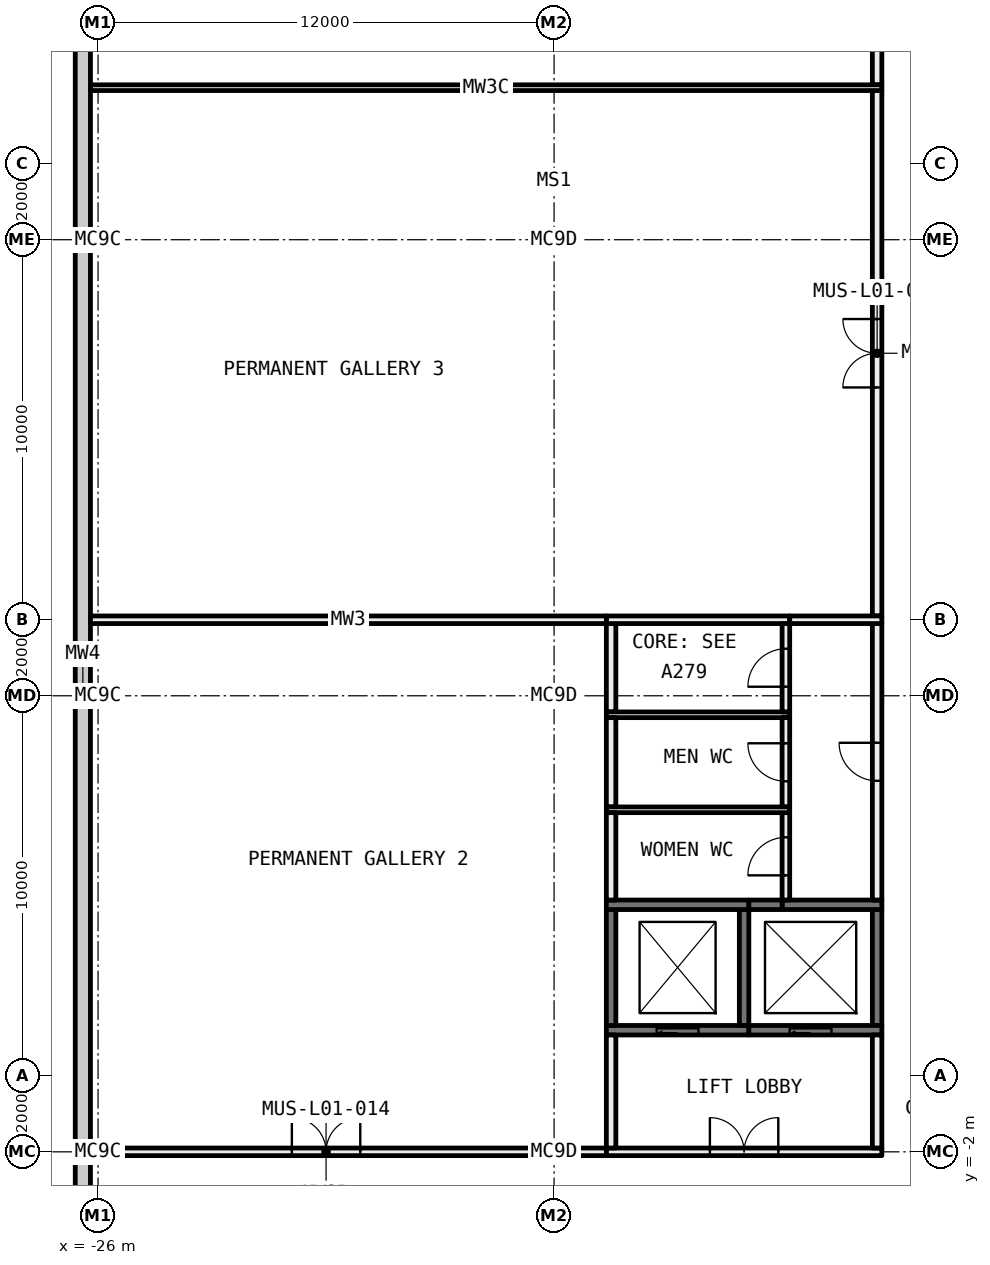
"""IFC4 building model, lengths in metres.
Left out: names, types, materials, properties, quantities, classifications, styles, units other than length and angle.
Written with IfcOpenShell. Run it as: python <this file> out.ifc"""

import sys

from ifc_helpers import new_model, si_unit, direction, frame, frame_2d, origin, origin_2d, place, context, subcontext, project, spatial, rectangle, i_section, extrude, element, fill, save


model = new_model("IFC4")
c1 = context("Model", 3, precision=1e-05, world=origin(), true_north=direction((0.0, 1.0)))
c2 = subcontext(c1, "Body", "Model", "MODEL_VIEW")
j1 = project(units=[si_unit("LENGTHUNIT", "METRE"), si_unit("PLANEANGLEUNIT", "RADIAN")], contexts=[c1])
p1 = place(None, origin())
s1 = spatial("IfcSite", under=j1, at=p1, CompositionType="ELEMENT")
p2 = place(p1, origin())
s2 = spatial("IfcBuilding", under=s1, at=p2, CompositionType="ELEMENT")
p3 = place(p2, frame((0.0, 0.0, 6.0)))
s3 = spatial("IfcBuildingStorey", under=s2, at=p3, CompositionType="ELEMENT", Elevation=6.0)
for number, where, z_axis, x_axis in (
    (1, (-26.0, -2.0, 0.0), (0.0, 0.0, 1.0), (1.0, 0.0, 0.0)),
    (2, (-26.0, 10.0, 0.0), (0.0, 0.0, 1.0), (1.0, 0.0, 0.0)),
    (3, (-26.0, 22.0, 0.0), (0.0, 0.0, 1.0), (1.0, 0.0, 0.0)),
    (4, (-14.0, -2.0, 0.0), (0.0, 0.0, 1.0), (1.0, 0.0, 0.0)),
    (5, (-14.0, 10.0, 0.0), (0.0, 0.0, 1.0), (1.0, 0.0, 0.0)),
    (6, (-14.0, 22.0, 0.0), (0.0, 0.0, 1.0), (1.0, 0.0, 0.0)),
):
    element("IfcColumn", number, at=place(p3, frame(where, z_axis=z_axis, x_axis=x_axis)), inside=s3, PredefinedType="COLUMN", context=c2, shape_type="SweptSolid", body=[
        extrude(i_section(OverallWidth=0.4, OverallDepth=0.4, WebThickness=0.013, FlangeThickness=0.021, FilletRadius=0.022, at=origin_2d()), origin(), (0.0, 0.0, 1.0), 5.6),
    ])
p4 = place(p3, frame((-12.5, 9.575, 0.0), z_axis=(0.0, 0.0, 1.0), x_axis=(0.0, 1.0, 0.0)))
e7 = element("IfcWall", 7, at=p4, inside=s3, PredefinedType="PARTITIONING", context=c2, shape_type="SweptSolid", body=[
    extrude(rectangle(XDim=2.325, YDim=0.25, at=frame_2d((1.163, 0.0))), origin(), (0.0, 0.0, 1.0), 5.6),
])
p5 = place(p3, frame((-12.625, 12.0, 0.0), z_axis=(0.0, 0.0, 1.0), x_axis=(1.0, 0.0, 0.0)))
e8 = element("IfcWall", 8, at=p5, inside=s3, PredefinedType="PARTITIONING", context=c2, shape_type="SweptSolid", body=[
    extrude(rectangle(XDim=4.825, YDim=0.2, at=frame_2d((2.413, 0.0))), origin(), (0.0, 0.0, 1.0), 5.6),
])
p6 = place(p3, frame((-12.625, -2.0, 0.0), z_axis=(0.0, 0.0, 1.0), x_axis=(1.0, 0.0, 0.0)))
e9 = element("IfcWall", 9, at=p6, inside=s3, PredefinedType="PARTITIONING", context=c2, shape_type="SweptSolid", body=[
    extrude(rectangle(XDim=7.25, YDim=0.2, at=frame_2d((3.625, 0.0))), origin(), (0.0, 0.0, 1.0), 5.012),
])
p7 = place(p6, frame((2.725, 0.0, 0.0)))
e10 = element("IfcOpeningElement", 10, at=p7, cuts=e9, PredefinedType="OPENING", context=c2, shape_type="SweptSolid", body=[
    extrude(rectangle(XDim=1.8, YDim=2.1, at=frame_2d((0.9, 1.05))), frame((0.0, 0.11, 0.0), z_axis=(0.0, -1.0, 0.0), x_axis=(1.0, 0.0, 0.0)), (0.0, 0.0, 1.0), 0.22),
])
p8 = place(p3, frame((-5.5, -1.9, 0.0), z_axis=(0.0, 0.0, 1.0), x_axis=(0.0, 1.0, 0.0)))
e11 = element("IfcWall", 11, at=p8, inside=s3, PredefinedType="PARTITIONING", context=c2, shape_type="SweptSolid", body=[
    extrude(rectangle(XDim=2.975, YDim=0.25, at=frame_2d((1.487, 0.0))), origin(), (0.0, 0.0, 1.0), 5.6),
])
p9 = place(p3, frame((-25.8, -2.0, 0.0), z_axis=(0.0, 0.0, 1.0), x_axis=(1.0, 0.0, 0.0)))
e12 = element("IfcWall", 12, at=p9, inside=s3, PredefinedType="PARTITIONING", context=c2, shape_type="SweptSolid", body=[
    extrude(rectangle(XDim=11.6, YDim=0.2, at=frame_2d((5.8, 0.0))), origin(), (0.0, 0.0, 1.0), 5.012),
])
p10 = place(p9, frame((4.9, 0.0, 0.0)))
e13 = element("IfcOpeningElement", 13, at=p10, cuts=e12, PredefinedType="OPENING", context=c2, shape_type="SweptSolid", body=[
    extrude(rectangle(XDim=1.8, YDim=2.1, at=frame_2d((0.9, 1.05))), frame((0.0, 0.11, 0.0), z_axis=(0.0, -1.0, 0.0), x_axis=(1.0, 0.0, 0.0)), (0.0, 0.0, 1.0), 0.22),
])
p11 = place(p3, frame((-13.8, -2.0, 0.0), z_axis=(0.0, 0.0, 1.0), x_axis=(1.0, 0.0, 0.0)))
e14 = element("IfcWall", 14, at=p11, inside=s3, PredefinedType="PARTITIONING", context=c2, shape_type="SweptSolid", body=[
    extrude(rectangle(XDim=1.175, YDim=0.2, at=frame_2d((0.587, 0.0))), origin(), (0.0, 0.0, 1.0), 5.012),
])
p12 = place(p3, frame((-5.5, 12.1, 0.0), z_axis=(0.0, 0.0, 1.0), x_axis=(0.0, 1.0, 0.0)))
e15 = element("IfcWall", 15, at=p12, inside=s3, PredefinedType="PARTITIONING", context=c2, shape_type="SweptSolid", body=[
    extrude(rectangle(XDim=13.825, YDim=0.25, at=frame_2d((6.913, 0.0))), origin(), (0.0, 0.0, 1.0), 5.6),
])
p13 = place(p12, frame((6.013, 0.0, 0.0)))
e16 = element("IfcOpeningElement", 16, at=p13, cuts=e15, PredefinedType="OPENING", context=c2, shape_type="SweptSolid", body=[
    extrude(rectangle(XDim=1.8, YDim=2.1, at=frame_2d((0.9, 1.05))), frame((0.0, 0.135, 0.0), z_axis=(0.0, -1.0, 0.0), x_axis=(1.0, 0.0, 0.0)), (0.0, 0.0, 1.0), 0.27),
])
p14 = place(p3, frame((-5.5, 1.325, 0.0), z_axis=(0.0, 0.0, 1.0), x_axis=(0.0, 1.0, 0.0)))
e17 = element("IfcWall", 17, at=p14, inside=s3, PredefinedType="SHEAR", context=c2, shape_type="SweptSolid", body=[
    extrude(rectangle(XDim=3.05, YDim=0.25, at=frame_2d((1.525, 0.0))), origin(), (0.0, 0.0, 1.0), 5.6),
])
p15 = place(p3, frame((-5.5, 26.075, 0.0), z_axis=(0.0, 0.0, 1.0), x_axis=(0.0, 1.0, 0.0)))
e18 = element("IfcWall", 18, at=p15, inside=s3, PredefinedType="PARTITIONING", context=c2, shape_type="SweptSolid", body=[
    extrude(rectangle(XDim=16.4, YDim=0.25, at=frame_2d((8.2, 0.0))), origin(), (0.0, 0.0, 1.0), 5.6),
])
p16 = place(p15, frame((7.3, 0.0, 0.0)))
e19 = element("IfcOpeningElement", 19, at=p16, cuts=e18, PredefinedType="OPENING", context=c2, shape_type="SweptSolid", body=[
    extrude(rectangle(XDim=1.8, YDim=2.1, at=frame_2d((0.9, 1.05))), frame((0.0, 0.135, 0.0), z_axis=(0.0, -1.0, 0.0), x_axis=(1.0, 0.0, 0.0)), (0.0, 0.0, 1.0), 0.27),
])
p17 = place(p3, frame((-5.5, 4.625, 0.0), z_axis=(0.0, 0.0, 1.0), x_axis=(0.0, 1.0, 0.0)))
e20 = element("IfcWall", 20, at=p17, inside=s3, PredefinedType="PARTITIONING", context=c2, shape_type="SweptSolid", body=[
    extrude(rectangle(XDim=7.275, YDim=0.25, at=frame_2d((3.637, 0.0))), origin(), (0.0, 0.0, 1.0), 5.6),
])
p18 = place(p17, frame((3.138, 0.0, 0.0)))
e21 = element("IfcOpeningElement", 21, at=p18, cuts=e20, PredefinedType="OPENING", context=c2, shape_type="SweptSolid", body=[
    extrude(rectangle(XDim=1.0, YDim=2.1, at=frame_2d((0.5, 1.05))), frame((0.0, 0.135, 0.0), z_axis=(0.0, -1.0, 0.0), x_axis=(1.0, 0.0, 0.0)), (0.0, 0.0, 1.0), 0.27),
])
p19 = place(p3, frame((-12.625, 1.2, 0.0), z_axis=(0.0, 0.0, 1.0), x_axis=(1.0, 0.0, 0.0)))
e22 = element("IfcWall", 22, at=p19, inside=s3, PredefinedType="SHEAR", context=c2, shape_type="SweptSolid", body=[
    extrude(rectangle(XDim=3.75, YDim=0.25, at=frame_2d((1.875, 0.0))), origin(), (0.0, 0.0, 1.0), 5.6),
])
p20 = place(p19, frame((1.325, 0.0, 0.0)))
e23 = element("IfcOpeningElement", 23, at=p20, cuts=e22, PredefinedType="OPENING", context=c2, shape_type="SweptSolid", body=[
    extrude(rectangle(XDim=1.1, YDim=2.1, at=frame_2d((0.55, 1.05))), frame((0.0, 0.135, 0.0), z_axis=(0.0, -1.0, 0.0), x_axis=(1.0, 0.0, 0.0)), (0.0, 0.0, 1.0), 0.27),
])
p21 = place(p3, frame((-12.5, -1.9, 0.0), z_axis=(0.0, 0.0, 1.0), x_axis=(0.0, 1.0, 0.0)))
e24 = element("IfcWall", 24, at=p21, inside=s3, PredefinedType="PARTITIONING", context=c2, shape_type="SweptSolid", body=[
    extrude(rectangle(XDim=2.975, YDim=0.25, at=frame_2d((1.487, 0.0))), origin(), (0.0, 0.0, 1.0), 5.6),
])
p22 = place(p3, frame((-8.875, 1.2, 0.0), z_axis=(0.0, 0.0, 1.0), x_axis=(1.0, 0.0, 0.0)))
e25 = element("IfcWall", 25, at=p22, inside=s3, PredefinedType="SHEAR", context=c2, shape_type="SweptSolid", body=[
    extrude(rectangle(XDim=3.5, YDim=0.25, at=frame_2d((1.75, 0.0))), origin(), (0.0, 0.0, 1.0), 5.6),
])
p23 = place(p22, frame((1.075, 0.0, 0.0)))
e26 = element("IfcOpeningElement", 26, at=p23, cuts=e25, PredefinedType="OPENING", context=c2, shape_type="SweptSolid", body=[
    extrude(rectangle(XDim=1.1, YDim=2.1, at=frame_2d((0.55, 1.05))), frame((0.0, 0.135, 0.0), z_axis=(0.0, -1.0, 0.0), x_axis=(1.0, 0.0, 0.0)), (0.0, 0.0, 1.0), 0.27),
])
p24 = place(p3, frame((-12.625, 9.5, 0.0), z_axis=(0.0, 0.0, 1.0), x_axis=(1.0, 0.0, 0.0)))
e27 = element("IfcWall", 27, at=p24, inside=s3, PredefinedType="PARTITIONING", context=c2, shape_type="SweptSolid", body=[
    extrude(rectangle(XDim=4.825, YDim=0.15, at=frame_2d((2.413, 0.0))), origin(), (0.0, 0.0, 1.0), 5.6),
])
p25 = place(p3, frame((-12.5, 7.075, 0.0), z_axis=(0.0, 0.0, 1.0), x_axis=(0.0, 1.0, 0.0)))
e28 = element("IfcWall", 28, at=p25, inside=s3, PredefinedType="PARTITIONING", context=c2, shape_type="SweptSolid", body=[
    extrude(rectangle(XDim=2.35, YDim=0.25, at=frame_2d((1.175, 0.0))), origin(), (0.0, 0.0, 1.0), 5.6),
])
for number, where, z_axis, x_axis in (
    (29, (-12.5, 1.325, 0.0), (0.0, 0.0, 1.0), (0.0, 1.0, 0.0)),
    (30, (-9.0, 1.325, 0.0), (0.0, 0.0, 1.0), (0.0, 1.0, 0.0)),
):
    element("IfcWall", number, at=place(p3, frame(where, z_axis=z_axis, x_axis=x_axis)), inside=s3, PredefinedType="SHEAR", context=c2, shape_type="SweptSolid", body=[
        extrude(rectangle(XDim=3.05, YDim=0.25, at=frame_2d((1.525, 0.0))), origin(), (0.0, 0.0, 1.0), 5.6),
    ])
p26 = place(p3, frame((-12.625, 4.5, 0.0), z_axis=(0.0, 0.0, 1.0), x_axis=(1.0, 0.0, 0.0)))
e31 = element("IfcWall", 31, at=p26, inside=s3, PredefinedType="SHEAR", context=c2, shape_type="SweptSolid", body=[
    extrude(rectangle(XDim=3.75, YDim=0.25, at=frame_2d((1.875, 0.0))), origin(), (0.0, 0.0, 1.0), 5.6),
])
p27 = place(p3, frame((-26.2, 12.0, 0.0), z_axis=(0.0, 0.0, 1.0), x_axis=(1.0, 0.0, 0.0)))
e32 = element("IfcWall", 32, at=p27, inside=s3, PredefinedType="PARTITIONING", context=c2, shape_type="SweptSolid", body=[
    extrude(rectangle(XDim=13.575, YDim=0.2, at=frame_2d((6.788, 0.0))), origin(), (0.0, 0.0, 1.0), 5.6),
])
p28 = place(p3, frame((-26.2, 26.0, 0.0), z_axis=(0.0, 0.0, 1.0), x_axis=(1.0, 0.0, 0.0)))
e33 = element("IfcWall", 33, at=p28, inside=s3, PredefinedType="PARTITIONING", context=c2, shape_type="SweptSolid", body=[
    extrude(rectangle(XDim=20.825, YDim=0.15, at=frame_2d((10.413, 0.0))), origin(), (0.0, 0.0, 1.0), 5.6),
])
p29 = place(p3, frame((-8.0, 4.5, 0.0), z_axis=(0.0, 0.0, 1.0), x_axis=(1.0, 0.0, 0.0)))
e34 = element("IfcWall", 34, at=p29, inside=s3, PredefinedType="SHEAR", context=c2, shape_type="SweptSolid", body=[
    extrude(rectangle(XDim=2.625, YDim=0.25, at=frame_2d((1.312, 0.0))), origin(), (0.0, 0.0, 1.0), 5.6),
])
p30 = place(p3, frame((-8.875, 4.5, 0.0), z_axis=(0.0, 0.0, 1.0), x_axis=(1.0, 0.0, 0.0)))
e35 = element("IfcWall", 35, at=p30, inside=s3, PredefinedType="SHEAR", context=c2, shape_type="SweptSolid", body=[
    extrude(rectangle(XDim=0.875, YDim=0.25, at=frame_2d((0.438, 0.0))), origin(), (0.0, 0.0, 1.0), 5.6),
])
p31 = place(p3, frame((-7.9, 9.575, 0.0), z_axis=(0.0, 0.0, 1.0), x_axis=(0.0, 1.0, 0.0)))
e36 = element("IfcWall", 36, at=p31, inside=s3, PredefinedType="PARTITIONING", context=c2, shape_type="SweptSolid", body=[
    extrude(rectangle(XDim=2.325, YDim=0.2, at=frame_2d((1.163, 0.0))), origin(), (0.0, 0.0, 1.0), 5.6),
])
p32 = place(p31, frame((0.663, 0.0, 0.0)))
e37 = element("IfcOpeningElement", 37, at=p32, cuts=e36, PredefinedType="OPENING", context=c2, shape_type="SweptSolid", body=[
    extrude(rectangle(XDim=1.0, YDim=2.1, at=frame_2d((0.5, 1.05))), frame((0.0, 0.11, 0.0), z_axis=(0.0, -1.0, 0.0), x_axis=(1.0, 0.0, 0.0)), (0.0, 0.0, 1.0), 0.22),
])
p33 = place(p3, frame((-7.9, 7.075, 0.0), z_axis=(0.0, 0.0, 1.0), x_axis=(0.0, 1.0, 0.0)))
e38 = element("IfcWall", 38, at=p33, inside=s3, PredefinedType="PARTITIONING", context=c2, shape_type="SweptSolid", body=[
    extrude(rectangle(XDim=2.35, YDim=0.2, at=frame_2d((1.175, 0.0))), origin(), (0.0, 0.0, 1.0), 5.6),
])
p34 = place(p33, frame((0.675, 0.0, 0.0)))
e39 = element("IfcOpeningElement", 39, at=p34, cuts=e38, PredefinedType="OPENING", context=c2, shape_type="SweptSolid", body=[
    extrude(rectangle(XDim=1.0, YDim=2.1, at=frame_2d((0.5, 1.05))), frame((0.0, 0.11, 0.0), z_axis=(0.0, -1.0, 0.0), x_axis=(1.0, 0.0, 0.0)), (0.0, 0.0, 1.0), 0.22),
])
p35 = place(p3, frame((-7.8, 12.0, 0.0), z_axis=(0.0, 0.0, 1.0), x_axis=(1.0, 0.0, 0.0)))
e40 = element("IfcWall", 40, at=p35, inside=s3, PredefinedType="PARTITIONING", context=c2, shape_type="SweptSolid", body=[
    extrude(rectangle(XDim=2.425, YDim=0.2, at=frame_2d((1.212, 0.0))), origin(), (0.0, 0.0, 1.0), 5.6),
])
p36 = place(p3, frame((-7.9, 4.625, 0.0), z_axis=(0.0, 0.0, 1.0), x_axis=(0.0, 1.0, 0.0)))
e41 = element("IfcWall", 41, at=p36, inside=s3, PredefinedType="PARTITIONING", context=c2, shape_type="SweptSolid", body=[
    extrude(rectangle(XDim=2.3, YDim=0.2, at=frame_2d((1.15, 0.0))), origin(), (0.0, 0.0, 1.0), 5.6),
])
p37 = place(p36, frame((0.65, 0.0, 0.0)))
e42 = element("IfcOpeningElement", 42, at=p37, cuts=e41, PredefinedType="OPENING", context=c2, shape_type="SweptSolid", body=[
    extrude(rectangle(XDim=1.0, YDim=2.1, at=frame_2d((0.5, 1.05))), frame((0.0, 0.11, 0.0), z_axis=(0.0, -1.0, 0.0), x_axis=(1.0, 0.0, 0.0)), (0.0, 0.0, 1.0), 0.22),
])
p38 = place(p3, frame((-12.625, 7.0, 0.0), z_axis=(0.0, 0.0, 1.0), x_axis=(1.0, 0.0, 0.0)))
e43 = element("IfcWall", 43, at=p38, inside=s3, PredefinedType="PARTITIONING", context=c2, shape_type="SweptSolid", body=[
    extrude(rectangle(XDim=4.825, YDim=0.15, at=frame_2d((2.413, 0.0))), origin(), (0.0, 0.0, 1.0), 5.6),
])
p39 = place(p3, frame((-12.5, 4.625, 0.0), z_axis=(0.0, 0.0, 1.0), x_axis=(0.0, 1.0, 0.0)))
e44 = element("IfcWall", 44, at=p39, inside=s3, PredefinedType="PARTITIONING", context=c2, shape_type="SweptSolid", body=[
    extrude(rectangle(XDim=2.3, YDim=0.25, at=frame_2d((1.15, 0.0))), origin(), (0.0, 0.0, 1.0), 5.6),
])
p40 = place(p3, frame((-26.4, -26.2, -0.4), z_axis=(0.0, 0.0, 1.0), x_axis=(0.0, 1.0, 0.0)))
e45 = element("IfcWall", 45, at=p40, inside=s3, PredefinedType="STANDARD", context=c2, shape_type="SweptSolid", body=[
    extrude(rectangle(XDim=72.4, YDim=0.4, at=frame_2d((36.2, 0.0))), origin(), (0.0, 0.0, 1.0), 6.0),
])
p41 = place(p7, origin())
e46 = element("IfcDoor", 46, at=p41, inside=s3, OperationType="DOUBLE_DOOR_SINGLE_SWING", PredefinedType="DOOR", context=c2, shape_type="SweptSolid", body=[
    extrude(rectangle(XDim=1.8, YDim=2.1, at=frame_2d((0.9, 1.05))), frame((0.0, 0.025, 0.0), z_axis=(0.0, -1.0, 0.0), x_axis=(1.0, 0.0, 0.0)), (0.0, 0.0, 1.0), 0.05),
])
fill(e10, e46)
p42 = place(p20, origin())
e47 = element("IfcDoor", 47, at=p42, inside=s3, OperationType="SLIDING_TO_LEFT", PredefinedType="DOOR", context=c2, shape_type="SweptSolid", body=[
    extrude(rectangle(XDim=1.1, YDim=2.1, at=frame_2d((0.55, 1.05))), frame((0.0, 0.025, 0.0), z_axis=(0.0, -1.0, 0.0), x_axis=(1.0, 0.0, 0.0)), (0.0, 0.0, 1.0), 0.05),
])
fill(e23, e47)
p43 = place(p23, origin())
e48 = element("IfcDoor", 48, at=p43, inside=s3, OperationType="SLIDING_TO_LEFT", PredefinedType="DOOR", context=c2, shape_type="SweptSolid", body=[
    extrude(rectangle(XDim=1.1, YDim=2.1, at=frame_2d((0.55, 1.05))), frame((0.0, 0.025, 0.0), z_axis=(0.0, -1.0, 0.0), x_axis=(1.0, 0.0, 0.0)), (0.0, 0.0, 1.0), 0.05),
])
fill(e26, e48)
p44 = place(p18, origin())
e49 = element("IfcDoor", 49, at=p44, inside=s3, OperationType="SINGLE_SWING_LEFT", PredefinedType="DOOR", context=c2, shape_type="SweptSolid", body=[
    extrude(rectangle(XDim=1.0, YDim=2.1, at=frame_2d((0.5, 1.05))), frame((0.0, 0.025, 0.0), z_axis=(0.0, -1.0, 0.0), x_axis=(1.0, 0.0, 0.0)), (0.0, 0.0, 1.0), 0.05),
])
fill(e21, e49)
p45 = place(p37, origin())
e50 = element("IfcDoor", 50, at=p45, inside=s3, OperationType="SINGLE_SWING_RIGHT", PredefinedType="DOOR", context=c2, shape_type="SweptSolid", body=[
    extrude(rectangle(XDim=1.0, YDim=2.1, at=frame_2d((0.5, 1.05))), frame((0.0, 0.025, 0.0), z_axis=(0.0, -1.0, 0.0), x_axis=(1.0, 0.0, 0.0)), (0.0, 0.0, 1.0), 0.05),
])
fill(e42, e50)
p46 = place(p34, origin())
e51 = element("IfcDoor", 51, at=p46, inside=s3, OperationType="SINGLE_SWING_LEFT", PredefinedType="DOOR", context=c2, shape_type="SweptSolid", body=[
    extrude(rectangle(XDim=1.0, YDim=2.1, at=frame_2d((0.5, 1.05))), frame((0.0, 0.025, 0.0), z_axis=(0.0, -1.0, 0.0), x_axis=(1.0, 0.0, 0.0)), (0.0, 0.0, 1.0), 0.05),
])
fill(e39, e51)
p47 = place(p32, origin())
e52 = element("IfcDoor", 52, at=p47, inside=s3, OperationType="SINGLE_SWING_RIGHT", PredefinedType="DOOR", context=c2, shape_type="SweptSolid", body=[
    extrude(rectangle(XDim=1.0, YDim=2.1, at=frame_2d((0.5, 1.05))), frame((0.0, 0.025, 0.0), z_axis=(0.0, -1.0, 0.0), x_axis=(1.0, 0.0, 0.0)), (0.0, 0.0, 1.0), 0.05),
])
fill(e37, e52)
p48 = place(p10, origin())
e53 = element("IfcDoor", 53, at=p48, inside=s3, OperationType="DOUBLE_DOOR_SINGLE_SWING", PredefinedType="DOOR", context=c2, shape_type="SweptSolid", body=[
    extrude(rectangle(XDim=1.8, YDim=2.1, at=frame_2d((0.9, 1.05))), frame((0.0, 0.025, 0.0), z_axis=(0.0, -1.0, 0.0), x_axis=(1.0, 0.0, 0.0)), (0.0, 0.0, 1.0), 0.05),
])
fill(e13, e53)
p49 = place(p13, origin())
e54 = element("IfcDoor", 54, at=p49, inside=s3, OperationType="DOUBLE_DOOR_SINGLE_SWING", PredefinedType="DOOR", context=c2, shape_type="SweptSolid", body=[
    extrude(rectangle(XDim=1.8, YDim=2.1, at=frame_2d((0.9, 1.05))), frame((0.0, 0.025, 0.0), z_axis=(0.0, -1.0, 0.0), x_axis=(1.0, 0.0, 0.0)), (0.0, 0.0, 1.0), 0.05),
])
fill(e16, e54)
save(model, sys.argv[1])
